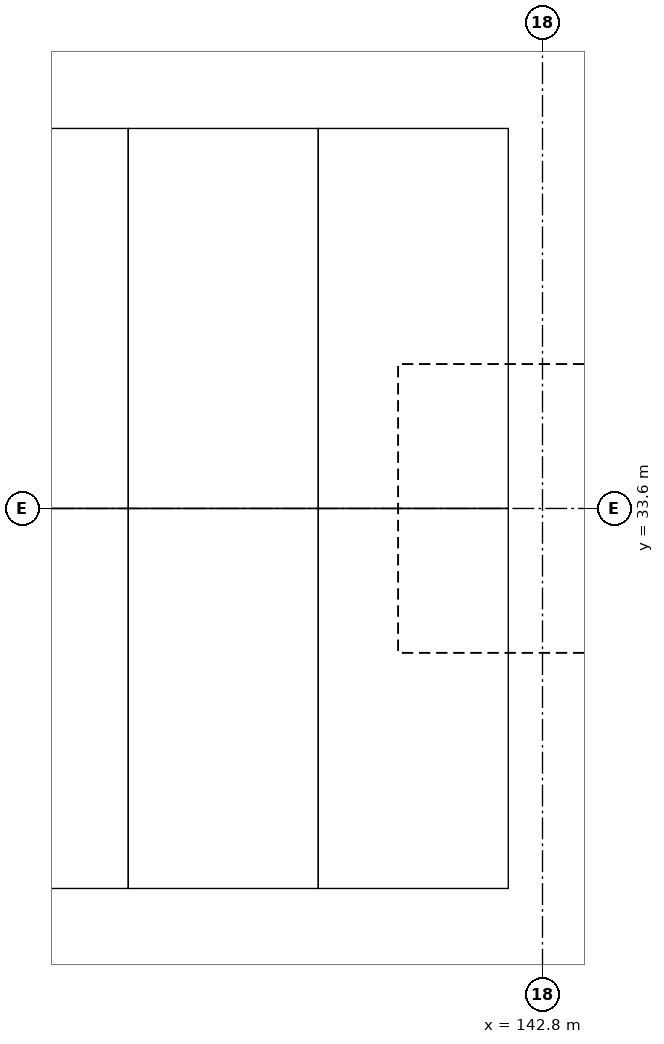
"""IFC4 building model, lengths in metres.
Left out: names, types, materials, properties, quantities, classifications, styles, units other than length and angle.
Written with IfcOpenShell. Run it as: python <this file> out.ifc"""

import sys

from ifc_helpers import new_model, si_unit, direction, frame, origin, origin_2d, place, context, subcontext, project, spatial, rectangle, extrude, element, save


model = new_model("IFC4")
c1 = context("Model", 3, precision=1e-05, world=origin(), true_north=direction((0.0, 1.0)))
c2 = subcontext(c1, "Body", "Model", "MODEL_VIEW")
j1 = project(units=[si_unit("LENGTHUNIT", "METRE"), si_unit("PLANEANGLEUNIT", "RADIAN")], contexts=[c1])
p1 = place(None, origin())
s1 = spatial("IfcSite", under=j1, at=p1, CompositionType="ELEMENT")
p2 = place(p1, origin())
s2 = spatial("IfcBuilding", under=s1, at=p2, CompositionType="ELEMENT")
p3 = place(p2, frame((0.0, 0.0, -3.0)))
s3 = spatial("IfcBuildingStorey", under=s2, at=p3, CompositionType="ELEMENT", Elevation=-3.0)
p4 = place(p3, frame((142.8, 33.6, 0.0), z_axis=(0.0, 0.0, 1.0), x_axis=(1.0, 0.0, 0.0)))
e1 = element("IfcColumn", 1, at=p4, inside=s3, PredefinedType="COLUMN", context=c2, shape_type="SweptSolid", body=[
    extrude(rectangle(XDim=0.8, YDim=0.8, at=origin_2d()), origin(), (0.0, 0.0, 1.0), 2.5),
])
save(model, sys.argv[1])
